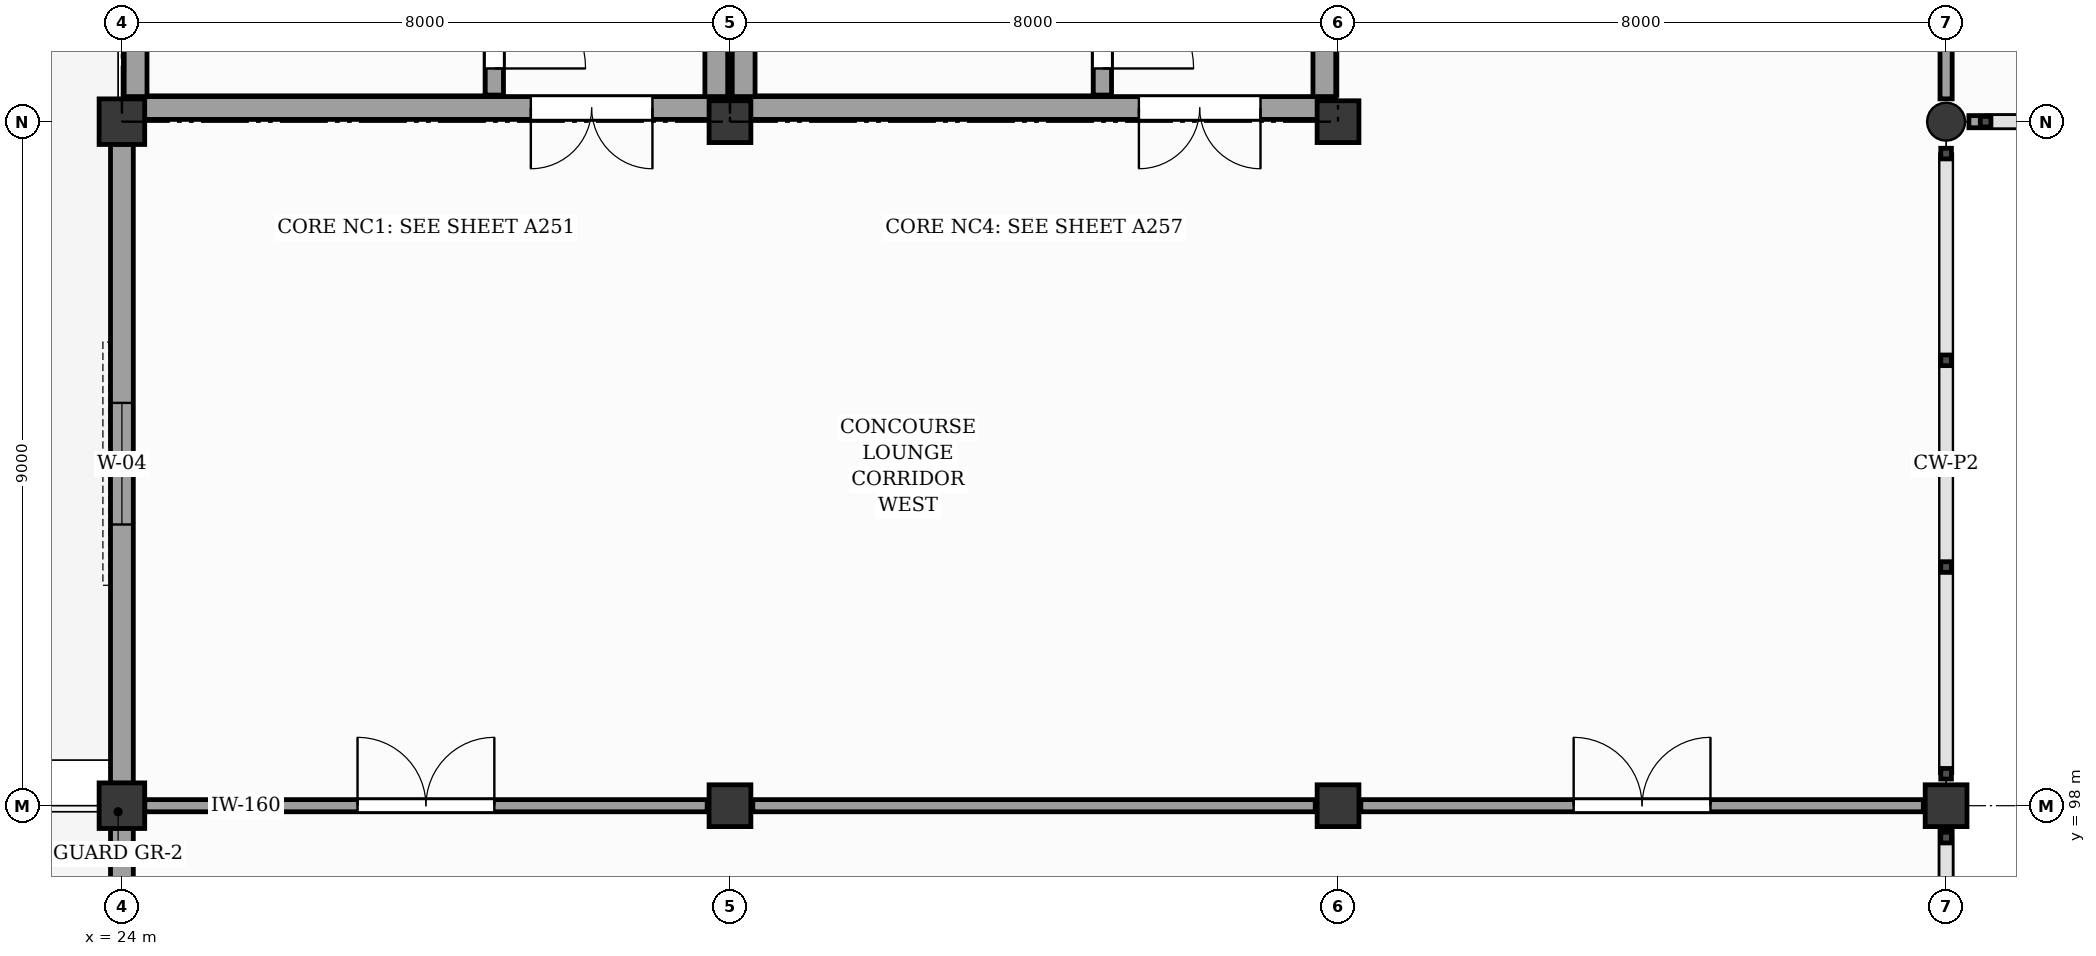
"""IFC4 building model, lengths in metres.
Left out: names, types, materials, properties, quantities, classifications, styles, units other than length and angle.
Written with IfcOpenShell. Run it as: python <this file> out.ifc"""

import sys

from ifc_helpers import new_model, si_unit, direction, frame, frame_2d, origin, origin_2d, place, context, subcontext, project, spatial, rectangle, circle, extrude, element, fill, save


model = new_model("IFC4")
c1 = context("Model", 3, precision=1e-05, world=origin(), true_north=direction((0.0, 1.0)))
c2 = subcontext(c1, "Body", "Model", "MODEL_VIEW")
j1 = project(units=[si_unit("LENGTHUNIT", "METRE"), si_unit("PLANEANGLEUNIT", "RADIAN")], contexts=[c1])
p1 = place(None, origin())
s1 = spatial("IfcSite", under=j1, at=p1, CompositionType="ELEMENT")
p2 = place(p1, origin())
s2 = spatial("IfcBuilding", under=s1, at=p2, CompositionType="ELEMENT")
p3 = place(p2, frame((0.0, 0.0, 9.6)))
s3 = spatial("IfcBuildingStorey", under=s2, at=p3, CompositionType="ELEMENT", Elevation=9.6)
for number, where, z_axis, x_axis in (
    (1, (24.0, 98.0, 0.0), (0.0, 0.0, 1.0), (1.0, 0.0, 0.0)),
    (2, (24.0, 107.0, 0.0), (0.0, 0.0, 1.0), (1.0, 0.0, 0.0)),
):
    element("IfcColumn", number, at=place(p3, frame(where, z_axis=z_axis, x_axis=x_axis)), inside=s3, PredefinedType="COLUMN", context=c2, shape_type="SweptSolid", body=[
        extrude(rectangle(XDim=0.6, YDim=0.6, at=origin_2d()), origin(), (0.0, 0.0, 1.0), 6.6),
    ])
for number, where, z_axis, x_axis in (
    (3, (32.0, 98.0, 0.0), (0.0, 0.0, 1.0), (1.0, 0.0, 0.0)),
    (4, (32.0, 107.0, 0.0), (0.0, 0.0, 1.0), (1.0, 0.0, 0.0)),
    (5, (40.0, 98.0, 0.0), (0.0, 0.0, 1.0), (1.0, 0.0, 0.0)),
    (6, (40.0, 107.0, 0.0), (0.0, 0.0, 1.0), (1.0, 0.0, 0.0)),
    (7, (48.0, 98.0, 0.0), (0.0, 0.0, 1.0), (1.0, 0.0, 0.0)),
):
    element("IfcColumn", number, at=place(p3, frame(where, z_axis=z_axis, x_axis=x_axis)), inside=s3, PredefinedType="COLUMN", context=c2, shape_type="SweptSolid", body=[
        extrude(rectangle(XDim=0.55, YDim=0.55, at=origin_2d()), origin(), (0.0, 0.0, 1.0), 6.6),
    ])
p4 = place(p3, frame((48.0, 107.0, 0.0), z_axis=(0.0, 0.0, 1.0), x_axis=(1.0, 0.0, 0.0)))
e8 = element("IfcColumn", 8, at=p4, inside=s3, PredefinedType="COLUMN", context=c2, shape_type="SweptSolid", body=[
    extrude(circle(Radius=0.25, at=origin_2d()), origin(), (0.0, 0.0, 1.0), 6.6),
])
p5 = place(p3, frame((24.0, 89.295, 0.0), z_axis=(0.0, 0.0, 1.0), x_axis=(0.0, 1.0, 0.0)))
e9 = element("IfcWall", 9, at=p5, inside=s3, PredefinedType="SOLIDWALL", context=c2, shape_type="SweptSolid", body=[
    extrude(rectangle(XDim=8.41, YDim=0.3, at=frame_2d((4.205, 0.0))), origin(), (0.0, 0.0, 1.0), 5.64),
])
p6 = place(p5, frame((3.405, 0.0, 0.95)))
e10 = element("IfcOpeningElement", 10, at=p6, cuts=e9, PredefinedType="OPENING", context=c2, shape_type="SweptSolid", body=[
    extrude(rectangle(XDim=1.6, YDim=2.1, at=frame_2d((0.8, 1.05))), frame((0.0, 0.16, 0.0), z_axis=(0.0, -1.0, 0.0), x_axis=(1.0, 0.0, 0.0)), (0.0, 0.0, 1.0), 0.32),
])
p7 = place(p3, frame((24.0, 98.295, 0.0), z_axis=(0.0, 0.0, 1.0), x_axis=(0.0, 1.0, 0.0)))
e11 = element("IfcWall", 11, at=p7, inside=s3, PredefinedType="SOLIDWALL", context=c2, shape_type="SweptSolid", body=[
    extrude(rectangle(XDim=8.41, YDim=0.3, at=frame_2d((4.205, 0.0))), origin(), (0.0, 0.0, 1.0), 5.64),
])
p8 = place(p7, frame((3.405, 0.0, 0.95)))
e12 = element("IfcOpeningElement", 12, at=p8, cuts=e11, PredefinedType="OPENING", context=c2, shape_type="SweptSolid", body=[
    extrude(rectangle(XDim=1.6, YDim=2.1, at=frame_2d((0.8, 1.05))), frame((0.0, 0.16, 0.0), z_axis=(0.0, -1.0, 0.0), x_axis=(1.0, 0.0, 0.0)), (0.0, 0.0, 1.0), 0.32),
])
p9 = place(p3, frame((28.9, 107.35, 0.0), z_axis=(0.0, 0.0, 1.0), x_axis=(0.0, 1.0, 0.0)))
e13 = element("IfcWall", 13, at=p9, inside=s3, PredefinedType="SHEAR", context=c2, shape_type="SweptSolid", body=[
    extrude(rectangle(XDim=8.3, YDim=0.24, at=frame_2d((4.15, 0.0))), origin(), (0.0, 0.0, 1.0), 6.32),
])
p10 = place(p9, frame((0.35, 0.0, 0.0)))
e14 = element("IfcOpeningElement", 14, at=p10, cuts=e13, PredefinedType="OPENING", context=c2, shape_type="SweptSolid", body=[
    extrude(rectangle(XDim=1.2, YDim=2.15, at=frame_2d((0.6, 1.075))), frame((0.0, 0.13, 0.0), z_axis=(0.0, -1.0, 0.0), x_axis=(1.0, 0.0, 0.0)), (0.0, 0.0, 1.0), 0.26),
])
for number, where, z_axis, x_axis in (
    (15, (24.18, 107.18, 0.0), (0.0, 0.0, 1.0), (0.0, 1.0, 0.0)),
    (16, (31.82, 107.18, 0.0), (0.0, 0.0, 1.0), (0.0, 1.0, 0.0)),
):
    element("IfcWall", number, at=place(p3, frame(where, z_axis=z_axis, x_axis=x_axis)), inside=s3, PredefinedType="SHEAR", context=c2, shape_type="SweptSolid", body=[
        extrude(rectangle(XDim=8.64, YDim=0.3, at=frame_2d((4.32, 0.0))), origin(), (0.0, 0.0, 1.0), 6.32),
    ])
p11 = place(p3, frame((24.03, 107.18, 0.0), z_axis=(0.0, 0.0, 1.0), x_axis=(1.0, 0.0, 0.0)))
e17 = element("IfcWall", 17, at=p11, inside=s3, PredefinedType="SHEAR", context=c2, shape_type="SweptSolid", body=[
    extrude(rectangle(XDim=7.94, YDim=0.3, at=frame_2d((3.97, 0.0))), origin(), (0.0, 0.0, 1.0), 6.32),
])
p12 = place(p11, frame((5.35, 0.0, 0.0)))
e18 = element("IfcOpeningElement", 18, at=p12, cuts=e17, PredefinedType="OPENING", context=c2, shape_type="SweptSolid", body=[
    extrude(rectangle(XDim=1.6, YDim=2.15, at=frame_2d((0.8, 1.075))), frame((0.0, 0.16, 0.0), z_axis=(0.0, -1.0, 0.0), x_axis=(1.0, 0.0, 0.0)), (0.0, 0.0, 1.0), 0.32),
])
p13 = place(p3, frame((36.9, 107.35, 0.0), z_axis=(0.0, 0.0, 1.0), x_axis=(0.0, 1.0, 0.0)))
e19 = element("IfcWall", 19, at=p13, inside=s3, PredefinedType="SHEAR", context=c2, shape_type="SweptSolid", body=[
    extrude(rectangle(XDim=8.3, YDim=0.24, at=frame_2d((4.15, 0.0))), origin(), (0.0, 0.0, 1.0), 6.32),
])
p14 = place(p13, frame((0.35, 0.0, 0.0)))
e20 = element("IfcOpeningElement", 20, at=p14, cuts=e19, PredefinedType="OPENING", context=c2, shape_type="SweptSolid", body=[
    extrude(rectangle(XDim=1.2, YDim=2.15, at=frame_2d((0.6, 1.075))), frame((0.0, 0.13, 0.0), z_axis=(0.0, -1.0, 0.0), x_axis=(1.0, 0.0, 0.0)), (0.0, 0.0, 1.0), 0.26),
])
for number, where, z_axis, x_axis in (
    (21, (32.18, 107.18, 0.0), (0.0, 0.0, 1.0), (0.0, 1.0, 0.0)),
    (22, (39.82, 107.18, 0.0), (0.0, 0.0, 1.0), (0.0, 1.0, 0.0)),
):
    element("IfcWall", number, at=place(p3, frame(where, z_axis=z_axis, x_axis=x_axis)), inside=s3, PredefinedType="SHEAR", context=c2, shape_type="SweptSolid", body=[
        extrude(rectangle(XDim=8.64, YDim=0.3, at=frame_2d((4.32, 0.0))), origin(), (0.0, 0.0, 1.0), 6.32),
    ])
p15 = place(p3, frame((32.03, 107.18, 0.0), z_axis=(0.0, 0.0, 1.0), x_axis=(1.0, 0.0, 0.0)))
e23 = element("IfcWall", 23, at=p15, inside=s3, PredefinedType="SHEAR", context=c2, shape_type="SweptSolid", body=[
    extrude(rectangle(XDim=7.94, YDim=0.3, at=frame_2d((3.97, 0.0))), origin(), (0.0, 0.0, 1.0), 6.32),
])
p16 = place(p15, frame((5.35, 0.0, 0.0)))
e24 = element("IfcOpeningElement", 24, at=p16, cuts=e23, PredefinedType="OPENING", context=c2, shape_type="SweptSolid", body=[
    extrude(rectangle(XDim=1.6, YDim=2.15, at=frame_2d((0.8, 1.075))), frame((0.0, 0.16, 0.0), z_axis=(0.0, -1.0, 0.0), x_axis=(1.0, 0.0, 0.0)), (0.0, 0.0, 1.0), 0.32),
])
p17 = place(p3, frame((24.3, 98.0, 0.0), z_axis=(0.0, 0.0, 1.0), x_axis=(1.0, 0.0, 0.0)))
e25 = element("IfcWall", 25, at=p17, inside=s3, PredefinedType="PARTITIONING", context=c2, shape_type="SweptSolid", body=[
    extrude(rectangle(XDim=7.4, YDim=0.16, at=frame_2d((3.7, 0.0))), origin(), (0.0, 0.0, 1.0), 5.5),
])
p18 = place(p17, frame((2.8, 0.0, 0.0)))
e26 = element("IfcOpeningElement", 26, at=p18, cuts=e25, PredefinedType="OPENING", context=c2, shape_type="SweptSolid", body=[
    extrude(rectangle(XDim=1.8, YDim=2.25, at=frame_2d((0.9, 1.125))), frame((0.0, 0.09, 0.0), z_axis=(0.0, -1.0, 0.0), x_axis=(1.0, 0.0, 0.0)), (0.0, 0.0, 1.0), 0.18),
])
p19 = place(p3, frame((32.3, 98.0, 0.0), z_axis=(0.0, 0.0, 1.0), x_axis=(1.0, 0.0, 0.0)))
e27 = element("IfcWall", 27, at=p19, inside=s3, PredefinedType="PARTITIONING", context=c2, shape_type="SweptSolid", body=[
    extrude(rectangle(XDim=7.4, YDim=0.16, at=frame_2d((3.7, 0.0))), origin(), (0.0, 0.0, 1.0), 5.5),
])
p20 = place(p3, frame((40.3, 98.0, 0.0), z_axis=(0.0, 0.0, 1.0), x_axis=(1.0, 0.0, 0.0)))
e28 = element("IfcWall", 28, at=p20, inside=s3, PredefinedType="PARTITIONING", context=c2, shape_type="SweptSolid", body=[
    extrude(rectangle(XDim=7.4, YDim=0.16, at=frame_2d((3.7, 0.0))), origin(), (0.0, 0.0, 1.0), 5.5),
])
p21 = place(p20, frame((2.8, 0.0, 0.0)))
e29 = element("IfcOpeningElement", 29, at=p21, cuts=e28, PredefinedType="OPENING", context=c2, shape_type="SweptSolid", body=[
    extrude(rectangle(XDim=1.8, YDim=2.25, at=frame_2d((0.9, 1.125))), frame((0.0, 0.09, 0.0), z_axis=(0.0, -1.0, 0.0), x_axis=(1.0, 0.0, 0.0)), (0.0, 0.0, 1.0), 0.18),
])
p22 = place(p3, frame((48.0, 89.3, 0.0), z_axis=(0.0, 0.0, 1.0), x_axis=(0.0, 1.0, 0.0)))
e30 = element("IfcWall", 30, at=p22, inside=s3, PredefinedType="PARTITIONING", context=c2, shape_type="SweptSolid", body=[
    extrude(rectangle(XDim=8.4, YDim=0.16, at=frame_2d((4.2, 0.0))), origin(), (0.0, 0.0, 1.0), 5.5),
])
p23 = place(p3, frame((48.3, 107.0, 0.0), z_axis=(0.0, 0.0, 1.0), x_axis=(1.0, 0.0, 0.0)))
e31 = element("IfcWall", 31, at=p23, inside=s3, PredefinedType="PARTITIONING", context=c2, shape_type="SweptSolid", body=[
    extrude(rectangle(XDim=7.4, YDim=0.16, at=frame_2d((3.7, 0.0))), origin(), (0.0, 0.0, 1.0), 5.5),
])
p24 = place(p3, frame((48.0, 107.3, 0.0), z_axis=(0.0, 0.0, 1.0), x_axis=(0.0, 1.0, 0.0)))
e32 = element("IfcWall", 32, at=p24, inside=s3, PredefinedType="PARTITIONING", context=c2, shape_type="SweptSolid", body=[
    extrude(rectangle(XDim=8.4, YDim=0.16, at=frame_2d((4.2, 0.0))), origin(), (0.0, 0.0, 1.0), 5.5),
])
p25 = place(p8, origin())
e33 = element("IfcWindow", 33, at=p25, inside=s3, PartitioningType="SINGLE_PANEL", PredefinedType="WINDOW", context=c2, shape_type="SweptSolid", body=[
    extrude(rectangle(XDim=1.6, YDim=2.1, at=frame_2d((0.8, 1.05))), frame((0.0, 0.03, 0.0), z_axis=(0.0, -1.0, 0.0), x_axis=(1.0, 0.0, 0.0)), (0.0, 0.0, 1.0), 0.06),
])
fill(e12, e33)
p26 = place(p10, frame((1.2, 0.0, 0.0), z_axis=(0.0, 0.0, 1.0), x_axis=(-1.0, 0.0, 0.0)))
e34 = element("IfcDoor", 34, at=p26, inside=s3, OperationType="SINGLE_SWING_LEFT", PredefinedType="DOOR", context=c2, shape_type="SweptSolid", body=[
    extrude(rectangle(XDim=1.2, YDim=2.15, at=frame_2d((0.6, 1.075))), frame((0.0, 0.025, 0.0), z_axis=(0.0, -1.0, 0.0), x_axis=(1.0, 0.0, 0.0)), (0.0, 0.0, 1.0), 0.05),
])
fill(e14, e34)
p27 = place(p12, frame((1.6, 0.0, 0.0), z_axis=(0.0, 0.0, 1.0), x_axis=(-1.0, 0.0, 0.0)))
e35 = element("IfcDoor", 35, at=p27, inside=s3, OperationType="DOUBLE_DOOR_SINGLE_SWING", PredefinedType="DOOR", context=c2, shape_type="SweptSolid", body=[
    extrude(rectangle(XDim=1.6, YDim=2.15, at=frame_2d((0.8, 1.075))), frame((0.0, 0.025, 0.0), z_axis=(0.0, -1.0, 0.0), x_axis=(1.0, 0.0, 0.0)), (0.0, 0.0, 1.0), 0.05),
])
fill(e18, e35)
p28 = place(p14, frame((1.2, 0.0, 0.0), z_axis=(0.0, 0.0, 1.0), x_axis=(-1.0, 0.0, 0.0)))
e36 = element("IfcDoor", 36, at=p28, inside=s3, OperationType="SINGLE_SWING_LEFT", PredefinedType="DOOR", context=c2, shape_type="SweptSolid", body=[
    extrude(rectangle(XDim=1.2, YDim=2.15, at=frame_2d((0.6, 1.075))), frame((0.0, 0.025, 0.0), z_axis=(0.0, -1.0, 0.0), x_axis=(1.0, 0.0, 0.0)), (0.0, 0.0, 1.0), 0.05),
])
fill(e20, e36)
p29 = place(p16, frame((1.6, 0.0, 0.0), z_axis=(0.0, 0.0, 1.0), x_axis=(-1.0, 0.0, 0.0)))
e37 = element("IfcDoor", 37, at=p29, inside=s3, OperationType="DOUBLE_DOOR_SINGLE_SWING", PredefinedType="DOOR", context=c2, shape_type="SweptSolid", body=[
    extrude(rectangle(XDim=1.6, YDim=2.15, at=frame_2d((0.8, 1.075))), frame((0.0, 0.025, 0.0), z_axis=(0.0, -1.0, 0.0), x_axis=(1.0, 0.0, 0.0)), (0.0, 0.0, 1.0), 0.05),
])
fill(e24, e37)
p30 = place(p18, origin())
e38 = element("IfcDoor", 38, at=p30, inside=s3, OperationType="DOUBLE_DOOR_SINGLE_SWING", PredefinedType="DOOR", context=c2, shape_type="SweptSolid", body=[
    extrude(rectangle(XDim=1.8, YDim=2.25, at=frame_2d((0.9, 1.125))), frame((0.0, 0.025, 0.0), z_axis=(0.0, -1.0, 0.0), x_axis=(1.0, 0.0, 0.0)), (0.0, 0.0, 1.0), 0.05),
])
fill(e26, e38)
p31 = place(p21, origin())
e39 = element("IfcDoor", 39, at=p31, inside=s3, OperationType="DOUBLE_DOOR_SINGLE_SWING", PredefinedType="DOOR", context=c2, shape_type="SweptSolid", body=[
    extrude(rectangle(XDim=1.8, YDim=2.25, at=frame_2d((0.9, 1.125))), frame((0.0, 0.025, 0.0), z_axis=(0.0, -1.0, 0.0), x_axis=(1.0, 0.0, 0.0)), (0.0, 0.0, 1.0), 0.05),
])
fill(e29, e39)
save(model, sys.argv[1])
